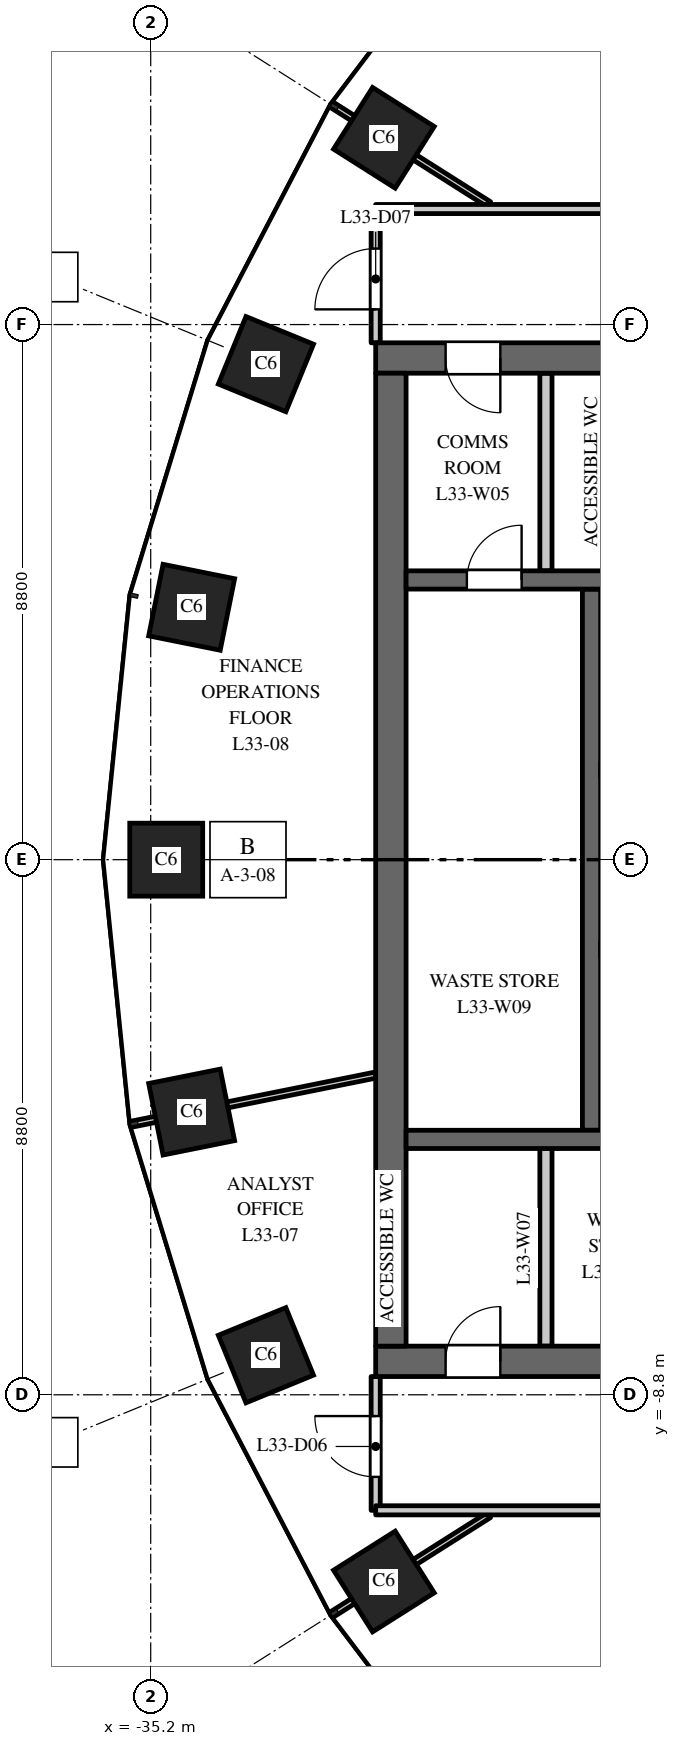
"""IFC4 building model, lengths in metres.
Left out: names, types, materials, properties, quantities, classifications, styles, units other than length and angle.
Written with IfcOpenShell. Run it as: python <this file> out.ifc"""

import sys

from ifc_helpers import new_model, si_unit, direction, frame, frame_2d, origin, origin_2d, place, context, subcontext, project, spatial, rectangle, extrude, element, fill, save


model = new_model("IFC4")
c1 = context("Model", 3, precision=1e-05, world=origin(), true_north=direction((0.0, 1.0)))
c2 = subcontext(c1, "Body", "Model", "MODEL_VIEW")
j1 = project(units=[si_unit("LENGTHUNIT", "METRE"), si_unit("PLANEANGLEUNIT", "RADIAN")], contexts=[c1])
p1 = place(None, origin())
s1 = spatial("IfcSite", under=j1, at=p1, CompositionType="ELEMENT")
p2 = place(p1, origin())
s2 = spatial("IfcBuilding", under=s1, at=p2, CompositionType="ELEMENT")
p3 = place(p2, frame((0.0, 0.0, 146.0)))
s3 = spatial("IfcBuildingStorey", under=s2, at=p3, CompositionType="ELEMENT", Elevation=146.0)
for number, where, z_axis, x_axis in (
    (1, (-31.365, 11.871, 0.0), (0.0, 0.0, 1.0), (-0.535, -0.845, 0.0)),
    (2, (-33.305, 8.149, 0.0), (0.0, 0.0, 1.0), (-0.379, -0.925, 0.0)),
    (3, (-34.527, 4.151, 0.0), (0.0, 0.0, 1.0), (-0.197, -0.98, 0.0)),
    (4, (-34.945, 0.0, 0.0), (0.0, 0.0, 1.0), (0.0, -1.0, 0.0)),
    (5, (-34.527, -4.151, 0.0), (0.0, 0.0, 1.0), (0.197, -0.98, 0.0)),
    (6, (-33.305, -8.149, 0.0), (0.0, 0.0, 1.0), (0.379, -0.925, 0.0)),
    (7, (-31.365, -11.871, 0.0), (0.0, 0.0, 1.0), (0.535, -0.845, 0.0)),
):
    element("IfcColumn", number, at=place(p3, frame(where, z_axis=z_axis, x_axis=x_axis)), inside=s3, PredefinedType="COLUMN", context=c2, shape_type="SweptSolid", body=[
        extrude(rectangle(XDim=1.2, YDim=1.2, at=origin_2d()), origin(), (0.0, 0.0, 1.0), 4.0),
    ])
p4 = place(p3, frame((-16.5, 8.25, 0.0), z_axis=(0.0, 0.0, 1.0), x_axis=(-1.0, 0.0, 0.0)))
e8 = element("IfcWall", 8, at=p4, inside=s3, PredefinedType="SHEAR", context=c2, shape_type="SweptSolid", body=[
    extrude(rectangle(XDim=15.0, YDim=0.5, at=frame_2d((7.5, 0.0))), origin(), (0.0, 0.0, 1.0), 3.7),
])
p5 = place(p4, frame((6.9, 0.0, 0.0)))
e9 = element("IfcOpeningElement", 9, at=p5, cuts=e8, PredefinedType="OPENING", context=c2, shape_type="SweptSolid", body=[
    extrude(rectangle(XDim=1.2, YDim=2.1, at=frame_2d((0.6, 1.05))), frame((0.0, 0.26, 0.0), z_axis=(0.0, -1.0, 0.0), x_axis=(1.0, 0.0, 0.0)), (0.0, 0.0, 1.0), 0.52),
])
p6 = place(p4, frame((12.95, 0.0, 0.0)))
e10 = element("IfcOpeningElement", 10, at=p6, cuts=e8, PredefinedType="OPENING", context=c2, shape_type="SweptSolid", body=[
    extrude(rectangle(XDim=0.9, YDim=2.1, at=frame_2d((0.45, 1.05))), frame((0.0, 0.26, 0.0), z_axis=(0.0, -1.0, 0.0), x_axis=(1.0, 0.0, 0.0)), (0.0, 0.0, 1.0), 0.52),
])
p7 = place(p3, frame((-16.5, -8.25, 0.0), z_axis=(0.0, 0.0, 1.0), x_axis=(-1.0, 0.0, 0.0)))
e11 = element("IfcWall", 11, at=p7, inside=s3, PredefinedType="SHEAR", context=c2, shape_type="SweptSolid", body=[
    extrude(rectangle(XDim=15.0, YDim=0.5, at=frame_2d((7.5, 0.0))), origin(), (0.0, 0.0, 1.0), 3.7),
])
p8 = place(p7, frame((6.9, 0.0, 0.0)))
e12 = element("IfcOpeningElement", 12, at=p8, cuts=e11, PredefinedType="OPENING", context=c2, shape_type="SweptSolid", body=[
    extrude(rectangle(XDim=1.2, YDim=2.1, at=frame_2d((0.6, 1.05))), frame((0.0, 0.26, 0.0), z_axis=(0.0, -1.0, 0.0), x_axis=(1.0, 0.0, 0.0)), (0.0, 0.0, 1.0), 0.52),
])
p9 = place(p7, frame((12.95, 0.0, 0.0)))
e13 = element("IfcOpeningElement", 13, at=p9, cuts=e11, PredefinedType="OPENING", context=c2, shape_type="SweptSolid", body=[
    extrude(rectangle(XDim=0.9, YDim=2.1, at=frame_2d((0.45, 1.05))), frame((0.0, 0.26, 0.0), z_axis=(0.0, -1.0, 0.0), x_axis=(1.0, 0.0, 0.0)), (0.0, 0.0, 1.0), 0.52),
])
p10 = place(p3, frame((-27.95, -4.45, 0.0), z_axis=(0.0, 0.0, 1.0), x_axis=(0.0, 1.0, 0.0)))
e14 = element("IfcWall", 14, at=p10, inside=s3, PredefinedType="SHEAR", context=c2, shape_type="SweptSolid", body=[
    extrude(rectangle(XDim=8.9, YDim=0.3, at=frame_2d((4.45, 0.0))), origin(), (0.0, 0.0, 1.0), 3.7),
])
p11 = place(p3, frame((-31.25, -8.0, 0.0), z_axis=(0.0, 0.0, 1.0), x_axis=(0.0, 1.0, 0.0)))
e15 = element("IfcWall", 15, at=p11, inside=s3, PredefinedType="SHEAR", context=c2, shape_type="SweptSolid", body=[
    extrude(rectangle(XDim=16.0, YDim=0.5, at=frame_2d((8.0, 0.0))), origin(), (0.0, 0.0, 1.0), 3.7),
])
p12 = place(p3, frame((-24.9, 4.6, 0.0), z_axis=(0.0, 0.0, 1.0), x_axis=(-1.0, 0.0, 0.0)))
e16 = element("IfcWall", 16, at=p12, inside=s3, PredefinedType="SHEAR", context=c2, shape_type="SweptSolid", body=[
    extrude(rectangle(XDim=6.1, YDim=0.3, at=frame_2d((3.05, 0.0))), origin(), (0.0, 0.0, 1.0), 3.7),
])
p13 = place(p12, frame((4.2, 0.0, 0.0)))
e17 = element("IfcOpeningElement", 17, at=p13, cuts=e16, PredefinedType="OPENING", context=c2, shape_type="SweptSolid", body=[
    extrude(rectangle(XDim=0.9, YDim=2.1, at=frame_2d((0.45, 1.05))), frame((0.0, 0.16, 0.0), z_axis=(0.0, -1.0, 0.0), x_axis=(1.0, 0.0, 0.0)), (0.0, 0.0, 1.0), 0.32),
])
for number, where, z_axis, x_axis in (
    (18, (-28.7, 4.75, 0.0), (0.0, 0.0, 1.0), (0.0, 1.0, 0.0)),
    (19, (-28.7, -8.0, 0.0), (0.0, 0.0, 1.0), (0.0, 1.0, 0.0)),
):
    element("IfcWall", number, at=place(p3, frame(where, z_axis=z_axis, x_axis=x_axis)), inside=s3, PredefinedType="PARTITIONING", context=c2, shape_type="SweptSolid", body=[
        extrude(rectangle(XDim=3.25, YDim=0.2, at=frame_2d((1.625, 0.0))), origin(), (0.0, 0.0, 1.0), 3.7),
    ])
p14 = place(p3, frame((-24.9, -4.6, 0.0), z_axis=(0.0, 0.0, 1.0), x_axis=(-1.0, 0.0, 0.0)))
e20 = element("IfcWall", 20, at=p14, inside=s3, PredefinedType="SHEAR", context=c2, shape_type="SweptSolid", body=[
    extrude(rectangle(XDim=6.1, YDim=0.3, at=frame_2d((3.05, 0.0))), origin(), (0.0, 0.0, 1.0), 3.7),
])
for number, where, z_axis, x_axis in (
    (21, (-24.9, -1.475, 0.0), (0.0, 0.0, 1.0), (-1.0, 0.0, 0.0)),
    (22, (-24.9, 1.475, 0.0), (0.0, 0.0, 1.0), (-1.0, 0.0, 0.0)),
):
    element("IfcWall", number, at=place(p3, frame(where, z_axis=z_axis, x_axis=x_axis)), inside=s3, PredefinedType="SHEAR", context=c2, shape_type="SweptSolid", body=[
        extrude(rectangle(XDim=2.9, YDim=0.25, at=frame_2d((1.45, 0.0))), origin(), (0.0, 0.0, 1.0), 3.7),
    ])
p15 = place(p3, frame((-35.512, -4.349, 0.0), z_axis=(0.0, 0.0, 1.0), x_axis=(0.980357474535, 0.197228857227, 0.0)))
e23 = element("IfcWall", 23, at=p15, inside=s3, PredefinedType="PARTITIONING", context=c2, shape_type="SweptSolid", body=[
    extrude(rectangle(XDim=4.092, YDim=0.1, at=frame_2d((2.046, 0.0))), origin(), (0.0, 0.0, 1.0), 3.2),
])
for number, where, z_axis, x_axis in (
    (24, (-32.212, -12.408, 0.0), (0.0, 0.0, 1.0), (0.845, 0.535, 0.0)),
    (25, (-32.212, 12.408, 0.0), (0.0, 0.0, 1.0), (0.845, -0.535, 0.0)),
):
    element("IfcWall", number, at=place(p3, frame(where, z_axis=z_axis, x_axis=x_axis)), inside=s3, PredefinedType="PARTITIONING", context=c2, shape_type="SweptSolid", body=[
        extrude(rectangle(XDim=3.048, YDim=0.1, at=frame_2d((1.524, 0.0))), origin(), (0.0, 0.0, 1.0), 3.7),
    ])
p16 = place(p3, frame((-31.5, -10.7, 0.0), z_axis=(0.0, 0.0, 1.0), x_axis=(0.0, 1.0, 0.0)))
e26 = element("IfcWall", 26, at=p16, inside=s3, PredefinedType="PARTITIONING", context=c2, shape_type="SweptSolid", body=[
    extrude(rectangle(XDim=2.2, YDim=0.15, at=frame_2d((1.1, 0.0))), origin(), (0.0, 0.0, 1.0), 3.7),
])
p17 = place(p16, frame((0.55, 0.0, 0.0)))
e27 = element("IfcOpeningElement", 27, at=p17, cuts=e26, PredefinedType="OPENING", context=c2, shape_type="SweptSolid", body=[
    extrude(rectangle(XDim=1.0, YDim=2.1, at=frame_2d((0.5, 1.05))), frame((0.0, 0.085, 0.0), z_axis=(0.0, -1.0, 0.0), x_axis=(1.0, 0.0, 0.0)), (0.0, 0.0, 1.0), 0.17),
])
p18 = place(p3, frame((-31.5, -10.7, 0.0), z_axis=(0.0, 0.0, 1.0), x_axis=(1.0, 0.0, 0.0)))
e28 = element("IfcWall", 28, at=p18, inside=s3, PredefinedType="PARTITIONING", context=c2, shape_type="SweptSolid", body=[
    extrude(rectangle(XDim=7.361, YDim=0.15, at=frame_2d((3.681, 0.0))), origin(), (0.0, 0.0, 1.0), 3.1),
])
p19 = place(p18, frame((5.629, 0.0, 0.0)))
e29 = element("IfcOpeningElement", 29, at=p19, cuts=e28, PredefinedType="OPENING", context=c2, shape_type="SweptSolid", body=[
    extrude(rectangle(XDim=1.0, YDim=2.1, at=frame_2d((0.5, 1.05))), frame((0.0, 0.085, 0.0), z_axis=(0.0, -1.0, 0.0), x_axis=(1.0, 0.0, 0.0)), (0.0, 0.0, 1.0), 0.17),
])
p20 = place(p3, frame((-31.5, 8.5, 0.0), z_axis=(0.0, 0.0, 1.0), x_axis=(0.0, 1.0, 0.0)))
e30 = element("IfcWall", 30, at=p20, inside=s3, PredefinedType="PARTITIONING", context=c2, shape_type="SweptSolid", body=[
    extrude(rectangle(XDim=2.2, YDim=0.15, at=frame_2d((1.1, 0.0))), origin(), (0.0, 0.0, 1.0), 3.7),
])
p21 = place(p20, frame((0.55, 0.0, 0.0)))
e31 = element("IfcOpeningElement", 31, at=p21, cuts=e30, PredefinedType="OPENING", context=c2, shape_type="SweptSolid", body=[
    extrude(rectangle(XDim=1.0, YDim=2.1, at=frame_2d((0.5, 1.05))), frame((0.0, 0.085, 0.0), z_axis=(0.0, -1.0, 0.0), x_axis=(1.0, 0.0, 0.0)), (0.0, 0.0, 1.0), 0.17),
])
p22 = place(p3, frame((-31.5, 10.7, 0.0), z_axis=(0.0, 0.0, 1.0), x_axis=(1.0, 0.0, 0.0)))
e32 = element("IfcWall", 32, at=p22, inside=s3, PredefinedType="PARTITIONING", context=c2, shape_type="SweptSolid", body=[
    extrude(rectangle(XDim=7.361, YDim=0.15, at=frame_2d((3.681, 0.0))), origin(), (0.0, 0.0, 1.0), 3.1),
])
p23 = place(p22, frame((5.604, 0.0, 0.0)))
e33 = element("IfcOpeningElement", 33, at=p23, cuts=e32, PredefinedType="OPENING", context=c2, shape_type="SweptSolid", body=[
    extrude(rectangle(XDim=1.0, YDim=2.1, at=frame_2d((0.5, 1.05))), frame((0.0, 0.085, 0.0), z_axis=(0.0, -1.0, 0.0), x_axis=(1.0, 0.0, 0.0)), (0.0, 0.0, 1.0), 0.17),
])
p24 = place(p6, origin())
e34 = element("IfcDoor", 34, at=p24, inside=s3, OperationType="SINGLE_SWING_RIGHT", PredefinedType="DOOR", context=c2, shape_type="SweptSolid", body=[
    extrude(rectangle(XDim=0.9, YDim=2.1, at=frame_2d((0.45, 1.05))), frame((0.0, 0.025, 0.0), z_axis=(0.0, -1.0, 0.0), x_axis=(1.0, 0.0, 0.0)), (0.0, 0.0, 1.0), 0.05),
])
fill(e10, e34)
p25 = place(p9, origin())
e35 = element("IfcDoor", 35, at=p25, inside=s3, OperationType="SINGLE_SWING_LEFT", PredefinedType="DOOR", context=c2, shape_type="SweptSolid", body=[
    extrude(rectangle(XDim=0.9, YDim=2.1, at=frame_2d((0.45, 1.05))), frame((0.0, 0.025, 0.0), z_axis=(0.0, -1.0, 0.0), x_axis=(1.0, 0.0, 0.0)), (0.0, 0.0, 1.0), 0.05),
])
fill(e13, e35)
p26 = place(p13, origin())
e36 = element("IfcDoor", 36, at=p26, inside=s3, OperationType="SINGLE_SWING_LEFT", PredefinedType="DOOR", context=c2, shape_type="SweptSolid", body=[
    extrude(rectangle(XDim=0.9, YDim=2.1, at=frame_2d((0.45, 1.05))), frame((0.0, 0.025, 0.0), z_axis=(0.0, -1.0, 0.0), x_axis=(1.0, 0.0, 0.0)), (0.0, 0.0, 1.0), 0.05),
])
fill(e17, e36)
p27 = place(p17, origin())
e37 = element("IfcDoor", 37, at=p27, inside=s3, OperationType="SINGLE_SWING_RIGHT", PredefinedType="DOOR", context=c2, shape_type="SweptSolid", body=[
    extrude(rectangle(XDim=1.0, YDim=2.1, at=frame_2d((0.5, 1.05))), frame((0.0, 0.025, 0.0), z_axis=(0.0, -1.0, 0.0), x_axis=(1.0, 0.0, 0.0)), (0.0, 0.0, 1.0), 0.05),
])
fill(e27, e37)
p28 = place(p21, origin())
e38 = element("IfcDoor", 38, at=p28, inside=s3, OperationType="SINGLE_SWING_LEFT", PredefinedType="DOOR", context=c2, shape_type="SweptSolid", body=[
    extrude(rectangle(XDim=1.0, YDim=2.1, at=frame_2d((0.5, 1.05))), frame((0.0, 0.025, 0.0), z_axis=(0.0, -1.0, 0.0), x_axis=(1.0, 0.0, 0.0)), (0.0, 0.0, 1.0), 0.05),
])
fill(e31, e38)
save(model, sys.argv[1])
